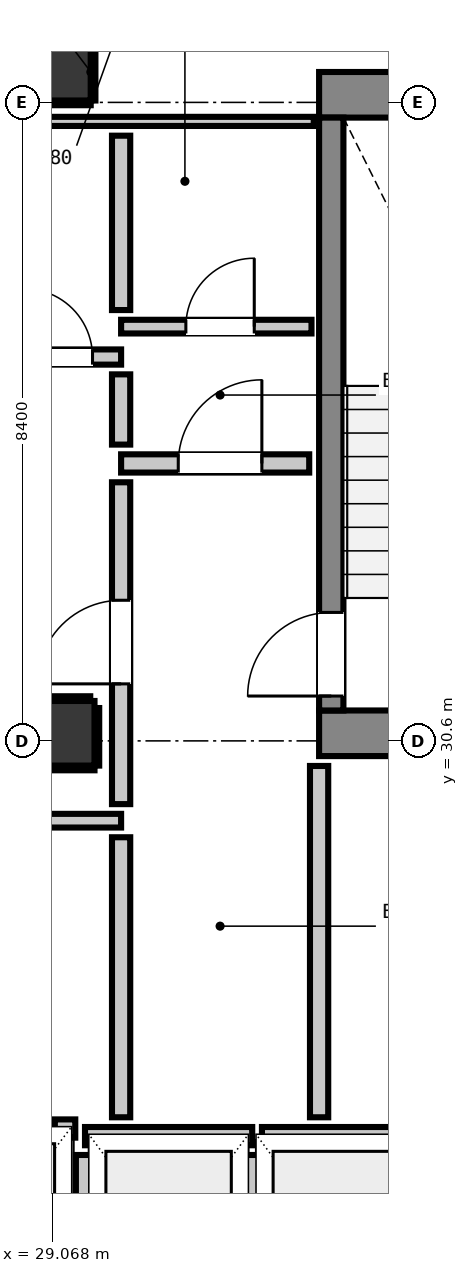
"""IFC4 building model, lengths in metres.
Left out: names, types, materials, properties, quantities, classifications, styles, units other than length and angle.
Written with IfcOpenShell. Run it as: python <this file> out.ifc"""

import sys

from ifc_helpers import new_model, si_unit, direction, frame, frame_2d, origin, origin_2d, place, context, subcontext, project, spatial, rectangle, extrude, element, fill, save


model = new_model("IFC4")
c1 = context("Model", 3, precision=1e-05, world=origin(), true_north=direction((0.0, 1.0)))
c2 = subcontext(c1, "Body", "Model", "MODEL_VIEW")
j1 = project(units=[si_unit("LENGTHUNIT", "METRE"), si_unit("PLANEANGLEUNIT", "RADIAN")], contexts=[c1])
p1 = place(None, origin())
s1 = spatial("IfcSite", under=j1, at=p1, CompositionType="ELEMENT")
p2 = place(p1, origin())
s2 = spatial("IfcBuilding", under=s1, at=p2, CompositionType="ELEMENT")
p3 = place(p2, frame((0.0, 0.0, 203.44)))
s3 = spatial("IfcBuildingStorey", under=s2, at=p3, CompositionType="ELEMENT", Elevation=203.44)
p4 = place(p3, frame((29.2, 39.4, 0.0), z_axis=(0.0, 0.0, 1.0), x_axis=(1.0, 0.0, 0.0)))
e1 = element("IfcColumn", 1, at=p4, inside=s3, PredefinedType="COLUMN", context=c2, shape_type="SweptSolid", body=[
    extrude(rectangle(XDim=0.75, YDim=0.75, at=origin_2d()), origin(), (0.0, 0.0, 1.0), 3.32),
])
p5 = place(p3, frame((32.58, 39.1, 0.0), z_axis=(0.0, 0.0, 1.0), x_axis=(1.0, 0.0, 0.0)))
e2 = element("IfcWall", 2, at=p5, inside=s3, PredefinedType="SHEAR", context=c2, shape_type="SweptSolid", body=[
    extrude(rectangle(XDim=4.08, YDim=0.6, at=frame_2d((2.04, 0.0))), origin(), (0.0, 0.0, 1.0), 3.32),
])
p6 = place(p3, frame((32.58, 30.7, 0.0), z_axis=(0.0, 0.0, 1.0), x_axis=(1.0, 0.0, 0.0)))
e3 = element("IfcWall", 3, at=p6, inside=s3, PredefinedType="SHEAR", context=c2, shape_type="SweptSolid", body=[
    extrude(rectangle(XDim=3.54, YDim=0.6, at=frame_2d((1.77, 0.0))), origin(), (0.0, 0.0, 1.0), 3.32),
])
p7 = place(p3, frame((32.74, 31.0, 0.0), z_axis=(0.0, 0.0, 1.0), x_axis=(0.0, 1.0, 0.0)))
e4 = element("IfcWall", 4, at=p7, inside=s3, PredefinedType="SHEAR", context=c2, shape_type="SweptSolid", body=[
    extrude(rectangle(XDim=7.8, YDim=0.32, at=frame_2d((3.9, 0.0))), origin(), (0.0, 0.0, 1.0), 3.32),
])
p8 = place(p7, frame((0.19, 0.0, 0.0)))
e5 = element("IfcOpeningElement", 5, at=p8, cuts=e4, PredefinedType="OPENING", context=c2, shape_type="SweptSolid", body=[
    extrude(rectangle(XDim=1.1, YDim=2.15, at=frame_2d((0.55, 1.075))), frame((0.0, 0.17, 0.0), z_axis=(0.0, -1.0, 0.0), x_axis=(1.0, 0.0, 0.0)), (0.0, 0.0, 1.0), 0.34),
])
p9 = place(p3, frame((29.2, 30.7, 0.0), z_axis=(0.0, 0.0, 1.0), x_axis=(1.0, 0.0, 0.0)))
e6 = element("IfcColumn", 6, at=p9, inside=s3, PredefinedType="COLUMN", context=c2, shape_type="SweptSolid", body=[
    extrude(rectangle(XDim=0.85, YDim=0.85, at=origin_2d()), origin(), (0.0, 0.0, 1.0), 3.32),
])
p10 = place(p3, frame((29.5, 25.4, 0.0), z_axis=(0.0, 0.0, 1.0), x_axis=(1.0, 0.0, 0.0)))
e7 = element("IfcWall", 7, at=p10, inside=s3, PredefinedType="PARTITIONING", context=c2, shape_type="SweptSolid", body=[
    extrude(rectangle(XDim=2.2, YDim=0.24, at=frame_2d((1.1, 0.0))), origin(), (0.0, 0.0, 1.0), 3.1),
])
p11 = place(p3, frame((29.5, 22.848, 0.0), z_axis=(0.0, 0.0, 1.0), x_axis=(0.0, 1.0, 0.0)))
e8 = element("IfcWall", 8, at=p11, inside=s3, PredefinedType="PARTITIONING", context=c2, shape_type="SweptSolid", body=[
    extrude(rectangle(XDim=2.304, YDim=0.24, at=frame_2d((1.152, 0.0))), origin(), (0.0, 0.0, 1.0), 2.335),
])
p12 = place(p3, frame((31.7, 22.848, 0.0), z_axis=(0.0, 0.0, 1.0), x_axis=(0.0, 1.0, 0.0)))
e9 = element("IfcWall", 9, at=p12, inside=s3, PredefinedType="PARTITIONING", context=c2, shape_type="SweptSolid", body=[
    extrude(rectangle(XDim=2.304, YDim=0.24, at=frame_2d((1.152, 0.0))), origin(), (0.0, 0.0, 1.0), 3.1),
])
p13 = place(p3, frame((31.828, 25.4, 0.0), z_axis=(0.0, 0.0, 1.0), x_axis=(1.0, 0.0, 0.0)))
e10 = element("IfcWall", 10, at=p13, inside=s3, PredefinedType="PARTITIONING", context=c2, shape_type="SweptSolid", body=[
    extrude(rectangle(XDim=2.072, YDim=0.24, at=frame_2d((1.036, 0.0))), origin(), (0.0, 0.0, 1.0), 3.1),
])
p14 = place(p3, frame((29.103, 25.5, 0.0), z_axis=(0.0, 0.0, 1.0), x_axis=(1.0, 0.0, 0.0)))
e11 = element("IfcWall", 11, at=p14, inside=s3, PredefinedType="PARTITIONING", context=c2, shape_type="SweptSolid", body=[
    extrude(rectangle(XDim=0.269, YDim=0.24, at=frame_2d((0.135, 0.0))), origin(), (0.0, 0.0, 1.0), 3.1),
])
p15 = place(p3, frame((29.975, 34.25, 0.0), z_axis=(0.0, 0.0, 1.0), x_axis=(1.0, 0.0, 0.0)))
e12 = element("IfcWall", 12, at=p15, inside=s3, PredefinedType="PARTITIONING", context=c2, shape_type="SweptSolid", body=[
    extrude(rectangle(XDim=2.475, YDim=0.24, at=frame_2d((1.237, 0.0))), origin(), (0.0, 0.0, 1.0), 3.1),
])
p16 = place(p15, frame((0.752, 0.0, 0.0)))
e13 = element("IfcOpeningElement", 13, at=p16, cuts=e12, PredefinedType="OPENING", context=c2, shape_type="SweptSolid", body=[
    extrude(rectangle(XDim=1.1, YDim=2.15, at=frame_2d((0.55, 1.075))), frame((0.0, 0.13, 0.0), z_axis=(0.0, -1.0, 0.0), x_axis=(1.0, 0.0, 0.0)), (0.0, 0.0, 1.0), 0.26),
])
p17 = place(p3, frame((18.95, 35.65, 0.0), z_axis=(0.0, 0.0, 1.0), x_axis=(1.0, 0.0, 0.0)))
e14 = element("IfcWall", 14, at=p17, inside=s3, PredefinedType="PARTITIONING", context=c2, shape_type="SweptSolid", body=[
    extrude(rectangle(XDim=11.025, YDim=0.2, at=frame_2d((5.513, 0.0))), origin(), (0.0, 0.0, 1.0), 3.1),
])
p18 = place(p17, frame((9.749, 0.0, 0.0)))
e15 = element("IfcOpeningElement", 15, at=p18, cuts=e14, PredefinedType="OPENING", context=c2, shape_type="SweptSolid", body=[
    extrude(rectangle(XDim=0.9, YDim=2.1, at=frame_2d((0.45, 1.05))), frame((0.0, 0.11, 0.0), z_axis=(0.0, -1.0, 0.0), x_axis=(1.0, 0.0, 0.0)), (0.0, 0.0, 1.0), 0.22),
])
p19 = place(p3, frame((28.593, 29.55, 0.0), z_axis=(0.0, 0.0, 1.0), x_axis=(1.0, 0.0, 0.0)))
e16 = element("IfcWall", 16, at=p19, inside=s3, PredefinedType="PARTITIONING", context=c2, shape_type="SweptSolid", body=[
    extrude(rectangle(XDim=1.382, YDim=0.18, at=frame_2d((0.691, 0.0))), origin(), (0.0, 0.0, 1.0), 3.1),
])
p20 = place(p3, frame((29.975, 36.05, 0.0), z_axis=(0.0, 0.0, 1.0), x_axis=(1.0, 0.0, 0.0)))
e17 = element("IfcWall", 17, at=p20, inside=s3, PredefinedType="PARTITIONING", context=c2, shape_type="SweptSolid", body=[
    extrude(rectangle(XDim=2.505, YDim=0.18, at=frame_2d((1.252, 0.0))), origin(), (0.0, 0.0, 1.0), 3.1),
])
p21 = place(p20, frame((0.852, 0.0, 0.0)))
e18 = element("IfcOpeningElement", 18, at=p21, cuts=e17, PredefinedType="OPENING", context=c2, shape_type="SweptSolid", body=[
    extrude(rectangle(XDim=0.9, YDim=2.1, at=frame_2d((0.45, 1.05))), frame((0.0, 0.1, 0.0), z_axis=(0.0, -1.0, 0.0), x_axis=(1.0, 0.0, 0.0)), (0.0, 0.0, 1.0), 0.2),
])
p22 = place(p3, frame((18.95, 38.75, 0.0), z_axis=(0.0, 0.0, 1.0), x_axis=(1.0, 0.0, 0.0)))
e19 = element("IfcWall", 19, at=p22, inside=s3, PredefinedType="PARTITIONING", context=c2, shape_type="SweptSolid", body=[
    extrude(rectangle(XDim=13.56, YDim=0.12, at=frame_2d((6.78, 0.0))), origin(), (0.0, 0.0, 1.0), 3.1),
])
p23 = place(p3, frame((29.975, 25.648, 0.0), z_axis=(0.0, 0.0, 1.0), x_axis=(0.0, 1.0, 0.0)))
e20 = element("IfcWall", 20, at=p23, inside=s3, PredefinedType="PARTITIONING", context=c2, shape_type="SweptSolid", body=[
    extrude(rectangle(XDim=3.684, YDim=0.24, at=frame_2d((1.842, 0.0))), origin(), (0.0, 0.0, 1.0), 3.1),
])
p24 = place(p3, frame((29.975, 29.768, 0.0), z_axis=(0.0, 0.0, 1.0), x_axis=(0.0, 1.0, 0.0)))
e21 = element("IfcWall", 21, at=p24, inside=s3, PredefinedType="PARTITIONING", context=c2, shape_type="SweptSolid", body=[
    extrude(rectangle(XDim=4.234, YDim=0.24, at=frame_2d((2.117, 0.0))), origin(), (0.0, 0.0, 1.0), 3.1),
])
p25 = place(p24, frame((1.582, 0.0, 0.0)))
e22 = element("IfcOpeningElement", 22, at=p25, cuts=e21, PredefinedType="OPENING", context=c2, shape_type="SweptSolid", body=[
    extrude(rectangle(XDim=1.1, YDim=2.15, at=frame_2d((0.55, 1.075))), frame((0.0, 0.13, 0.0), z_axis=(0.0, -1.0, 0.0), x_axis=(1.0, 0.0, 0.0)), (0.0, 0.0, 1.0), 0.26),
])
p26 = place(p3, frame((29.975, 34.498, 0.0), z_axis=(0.0, 0.0, 1.0), x_axis=(0.0, 1.0, 0.0)))
e23 = element("IfcWall", 23, at=p26, inside=s3, PredefinedType="PARTITIONING", context=c2, shape_type="SweptSolid", body=[
    extrude(rectangle(XDim=0.924, YDim=0.24, at=frame_2d((0.462, 0.0))), origin(), (0.0, 0.0, 1.0), 3.1),
])
p27 = place(p3, frame((29.975, 36.268, 0.0), z_axis=(0.0, 0.0, 1.0), x_axis=(0.0, 1.0, 0.0)))
e24 = element("IfcWall", 24, at=p27, inside=s3, PredefinedType="PARTITIONING", context=c2, shape_type="SweptSolid", body=[
    extrude(rectangle(XDim=2.294, YDim=0.24, at=frame_2d((1.147, 0.0))), origin(), (0.0, 0.0, 1.0), 3.1),
])
p28 = place(p3, frame((32.58, 25.648, 0.0), z_axis=(0.0, 0.0, 1.0), x_axis=(0.0, 1.0, 0.0)))
e25 = element("IfcWall", 25, at=p28, inside=s3, PredefinedType="PARTITIONING", context=c2, shape_type="SweptSolid", body=[
    extrude(rectangle(XDim=4.622, YDim=0.24, at=frame_2d((2.311, 0.0))), origin(), (0.0, 0.0, 1.0), 3.1),
])
p29 = place(p3, frame((28.833, 38.993, 0.0), z_axis=(0.0, 0.0, 1.0), x_axis=(1.0, 0.0, 0.0)))
e26 = element("IfcWall", 26, at=p29, inside=s3, PredefinedType="PARTITIONING", context=c2, shape_type="SweptSolid", body=[
    extrude(rectangle(XDim=0.742, YDim=0.06, at=frame_2d((0.371, 0.0))), origin(), (0.0, 0.0, 1.0), 1.45),
])
p30 = place(p3, frame((29.607, 39.025, 0.0), z_axis=(0.0, 0.0, 1.0), x_axis=(0.0, 1.0, 0.0)))
e27 = element("IfcWall", 27, at=p30, inside=s3, PredefinedType="PARTITIONING", context=c2, shape_type="SweptSolid", body=[
    extrude(rectangle(XDim=0.75, YDim=0.06, at=frame_2d((0.375, 0.0))), origin(), (0.0, 0.0, 1.0), 1.45),
])
p31 = place(p3, frame((28.775, 30.243, 0.0), z_axis=(0.0, 0.0, 1.0), x_axis=(1.0, 0.0, 0.0)))
e28 = element("IfcWall", 28, at=p31, inside=s3, PredefinedType="PARTITIONING", context=c2, shape_type="SweptSolid", body=[
    extrude(rectangle(XDim=0.85, YDim=0.06, at=frame_2d((0.425, 0.0))), origin(), (0.0, 0.0, 1.0), 1.45),
])
p32 = place(p3, frame((28.775, 31.157, 0.0), z_axis=(0.0, 0.0, 1.0), x_axis=(1.0, 0.0, 0.0)))
e29 = element("IfcWall", 29, at=p32, inside=s3, PredefinedType="PARTITIONING", context=c2, shape_type="SweptSolid", body=[
    extrude(rectangle(XDim=0.794, YDim=0.06, at=frame_2d((0.397, 0.0))), origin(), (0.0, 0.0, 1.0), 1.45),
])
p33 = place(p3, frame((29.657, 30.275, 0.0), z_axis=(0.0, 0.0, 1.0), x_axis=(0.0, 1.0, 0.0)))
e30 = element("IfcWall", 30, at=p33, inside=s3, PredefinedType="PARTITIONING", context=c2, shape_type="SweptSolid", body=[
    extrude(rectangle(XDim=0.757, YDim=0.06, at=frame_2d((0.378, 0.0))), origin(), (0.0, 0.0, 1.0), 1.45),
])
p34 = place(p8, origin())
e31 = element("IfcDoor", 31, at=p34, inside=s3, OperationType="SINGLE_SWING_LEFT", PredefinedType="DOOR", context=c2, shape_type="SweptSolid", body=[
    extrude(rectangle(XDim=1.1, YDim=2.15, at=frame_2d((0.55, 1.075))), frame((0.0, 0.025, 0.0), z_axis=(0.0, -1.0, 0.0), x_axis=(1.0, 0.0, 0.0)), (0.0, 0.0, 1.0), 0.05),
])
fill(e5, e31)
p35 = place(p25, origin())
e32 = element("IfcDoor", 32, at=p35, inside=s3, OperationType="SINGLE_SWING_LEFT", PredefinedType="DOOR", context=c2, shape_type="SweptSolid", body=[
    extrude(rectangle(XDim=1.1, YDim=2.15, at=frame_2d((0.55, 1.075))), frame((0.0, 0.025, 0.0), z_axis=(0.0, -1.0, 0.0), x_axis=(1.0, 0.0, 0.0)), (0.0, 0.0, 1.0), 0.05),
])
fill(e22, e32)
p36 = place(p16, origin())
e33 = element("IfcDoor", 33, at=p36, inside=s3, OperationType="SINGLE_SWING_RIGHT", PredefinedType="DOOR", context=c2, shape_type="SweptSolid", body=[
    extrude(rectangle(XDim=1.1, YDim=2.15, at=frame_2d((0.55, 1.075))), frame((0.0, 0.025, 0.0), z_axis=(0.0, -1.0, 0.0), x_axis=(1.0, 0.0, 0.0)), (0.0, 0.0, 1.0), 0.05),
])
fill(e13, e33)
p37 = place(p21, origin())
e34 = element("IfcDoor", 34, at=p37, inside=s3, OperationType="SINGLE_SWING_RIGHT", PredefinedType="DOOR", context=c2, shape_type="SweptSolid", body=[
    extrude(rectangle(XDim=0.9, YDim=2.1, at=frame_2d((0.45, 1.05))), frame((0.0, 0.025, 0.0), z_axis=(0.0, -1.0, 0.0), x_axis=(1.0, 0.0, 0.0)), (0.0, 0.0, 1.0), 0.05),
])
fill(e18, e34)
p38 = place(p18, origin())
e35 = element("IfcDoor", 35, at=p38, inside=s3, OperationType="SINGLE_SWING_LEFT", PredefinedType="DOOR", context=c2, shape_type="SweptSolid", body=[
    extrude(rectangle(XDim=0.9, YDim=2.1, at=frame_2d((0.45, 1.05))), frame((0.0, 0.025, 0.0), z_axis=(0.0, -1.0, 0.0), x_axis=(1.0, 0.0, 0.0)), (0.0, 0.0, 1.0), 0.05),
])
fill(e15, e35)
save(model, sys.argv[1])
